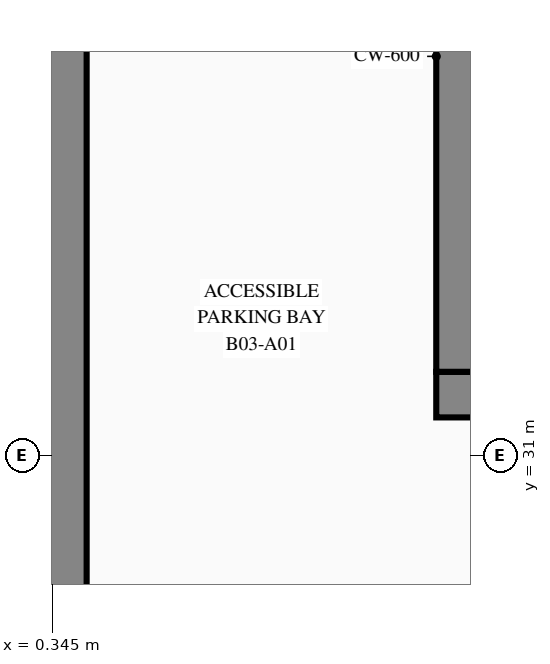
"""IFC4 building model, lengths in metres.
Left out: names, types, materials, properties, quantities, classifications, styles, units other than length and angle.
Written with IfcOpenShell. Run it as: python <this file> out.ifc"""

import sys

from ifc_helpers import new_model, si_unit, direction, frame, frame_2d, origin, place, context, subcontext, project, spatial, rectangle, extrude, element, save


model = new_model("IFC4")
c1 = context("Model", 3, precision=1e-05, world=origin(), true_north=direction((0.0, 1.0)))
c2 = subcontext(c1, "Body", "Model", "MODEL_VIEW")
j1 = project(units=[si_unit("LENGTHUNIT", "METRE"), si_unit("PLANEANGLEUNIT", "RADIAN")], contexts=[c1])
p1 = place(None, origin())
s1 = spatial("IfcSite", under=j1, at=p1, CompositionType="ELEMENT")
p2 = place(p1, origin())
s2 = spatial("IfcBuilding", under=s1, at=p2, CompositionType="ELEMENT")
p3 = place(p2, frame((0.0, 0.0, -13.5)))
s3 = spatial("IfcBuildingStorey", under=s2, at=p3, CompositionType="ELEMENT", Elevation=-13.5)
p4 = place(p3, frame((0.4, 0.8, 0.0), z_axis=(0.0, 0.0, 1.0), x_axis=(0.0, 1.0, 0.0)))
e1 = element("IfcWall", 1, at=p4, inside=s3, PredefinedType="USERDEFINED", context=c2, shape_type="SweptSolid", body=[
    extrude(rectangle(XDim=44.4, YDim=0.8, at=frame_2d((22.2, 0.0))), origin(), (0.0, 0.0, 1.0), 4.5),
])
p5 = place(p3, frame((5.4, 31.8, 0.0), z_axis=(0.0, 0.0, 1.0), x_axis=(1.0, 0.0, 0.0)))
e2 = element("IfcWall", 2, at=p5, inside=s3, PredefinedType="SHEAR", context=c2, shape_type="SweptSolid", body=[
    extrude(rectangle(XDim=18.05, YDim=0.6, at=frame_2d((9.025, 0.0))), origin(), (0.0, 0.0, 1.0), 4.5),
])
p6 = place(p5, frame((3.25, 0.0, 0.0)))
e3 = element("IfcOpeningElement", 3, at=p6, cuts=e2, PredefinedType="OPENING", context=c2, shape_type="SweptSolid", body=[
    extrude(rectangle(XDim=1.2, YDim=2.2, at=frame_2d((0.6, 1.1))), frame((0.0, 0.31, 0.0), z_axis=(0.0, -1.0, 0.0), x_axis=(1.0, 0.0, 0.0)), (0.0, 0.0, 1.0), 0.62),
])
p7 = place(p5, frame((7.1, 0.0, 0.0)))
e4 = element("IfcOpeningElement", 4, at=p7, cuts=e2, PredefinedType="OPENING", context=c2, shape_type="SweptSolid", body=[
    extrude(rectangle(XDim=1.2, YDim=2.2, at=frame_2d((0.6, 1.1))), frame((0.0, 0.31, 0.0), z_axis=(0.0, -1.0, 0.0), x_axis=(1.0, 0.0, 0.0)), (0.0, 0.0, 1.0), 0.62),
])
p8 = place(p5, frame((8.95, 0.0, 0.0)))
e5 = element("IfcOpeningElement", 5, at=p8, cuts=e2, PredefinedType="OPENING", context=c2, shape_type="SweptSolid", body=[
    extrude(rectangle(XDim=1.15, YDim=2.2, at=frame_2d((0.575, 1.1))), frame((0.0, 0.31, 0.0), z_axis=(0.0, -1.0, 0.0), x_axis=(1.0, 0.0, 0.0)), (0.0, 0.0, 1.0), 0.62),
])
p9 = place(p5, frame((16.05, 0.0, 0.0)))
e6 = element("IfcOpeningElement", 6, at=p9, cuts=e2, PredefinedType="OPENING", context=c2, shape_type="SweptSolid", body=[
    extrude(rectangle(XDim=1.2, YDim=2.2, at=frame_2d((0.6, 1.1))), frame((0.0, 0.31, 0.0), z_axis=(0.0, -1.0, 0.0), x_axis=(1.0, 0.0, 0.0)), (0.0, 0.0, 1.0), 0.62),
])
p10 = place(p3, frame((5.7, 32.1, 0.0), z_axis=(0.0, 0.0, 1.0), x_axis=(0.0, 1.0, 0.0)))
e7 = element("IfcWall", 7, at=p10, inside=s3, PredefinedType="SHEAR", context=c2, shape_type="SweptSolid", body=[
    extrude(rectangle(XDim=8.3, YDim=0.6, at=frame_2d((4.15, 0.0))), origin(), (0.0, 0.0, 1.0), 4.5),
])
save(model, sys.argv[1])
